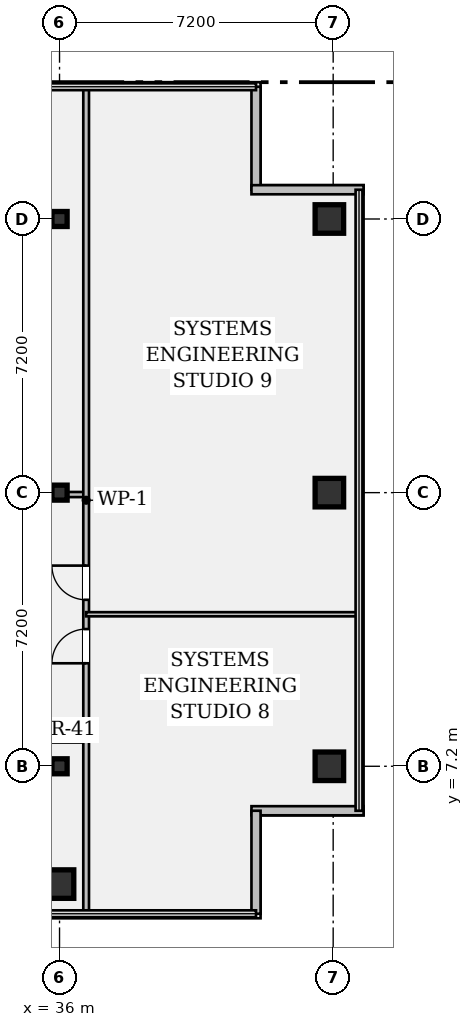
"""IFC4 building model, lengths in metres.
Left out: names, types, materials, properties, quantities, classifications, styles, units other than length and angle.
Written with IfcOpenShell. Run it as: python <this file> out.ifc"""

import sys

from ifc_helpers import new_model, si_unit, direction, frame, frame_2d, origin, origin_2d, place, context, subcontext, project, spatial, rectangle, hollow_rectangle, i_section, extrude, element, fill, save


model = new_model("IFC4")
c1 = context("Model", 3, precision=1e-05, world=origin(), true_north=direction((0.0, 1.0)))
c2 = subcontext(c1, "Body", "Model", "MODEL_VIEW")
j1 = project(units=[si_unit("LENGTHUNIT", "METRE"), si_unit("PLANEANGLEUNIT", "RADIAN")], contexts=[c1])
p1 = place(None, origin())
s1 = spatial("IfcSite", under=j1, at=p1, CompositionType="ELEMENT")
p2 = place(p1, origin())
s2 = spatial("IfcBuilding", under=s1, at=p2, CompositionType="ELEMENT")
p3 = place(p2, frame((0.0, 0.0, 229.25)))
s3 = spatial("IfcBuildingStorey", under=s2, at=p3, CompositionType="ELEMENT", Elevation=229.25)
p4 = place(p3, frame((36.0, 4.1, 0.0), z_axis=(0.0, 0.0, 1.0), x_axis=(1.0, 0.0, 0.0)))
e1 = element("IfcColumn", 1, at=p4, inside=s3, PredefinedType="COLUMN", context=c2, shape_type="SweptSolid", body=[
    extrude(hollow_rectangle(XDim=0.75, YDim=0.75, WallThickness=0.045, at=origin_2d()), origin(), (0.0, 0.0, 1.0), 3.24),
])
for number, where, z_axis, x_axis in (
    (2, (36.0, 7.2, 0.0), (0.0, 0.0, 1.0), (1.0, 0.0, 0.0)),
    (3, (36.0, 14.4, 0.0), (0.0, 0.0, 1.0), (1.0, 0.0, 0.0)),
    (4, (36.0, 21.6, 0.0), (0.0, 0.0, 1.0), (1.0, 0.0, 0.0)),
):
    element("IfcColumn", number, at=place(p3, frame(where, z_axis=z_axis, x_axis=x_axis)), inside=s3, PredefinedType="COLUMN", context=c2, shape_type="SweptSolid", body=[
        extrude(i_section(OverallWidth=0.399, OverallDepth=0.394, WebThickness=0.023, FlangeThickness=0.037, FilletRadius=0.018, at=origin_2d()), origin(), (0.0, 0.0, 1.0), 3.24),
    ])
for number, where, z_axis, x_axis in (
    (5, (43.1, 7.2, 0.0), (0.0, 0.0, 1.0), (1.0, 0.0, 0.0)),
    (6, (43.1, 14.4, 0.0), (0.0, 0.0, 1.0), (1.0, 0.0, 0.0)),
    (7, (43.1, 21.6, 0.0), (0.0, 0.0, 1.0), (1.0, 0.0, 0.0)),
):
    element("IfcColumn", number, at=place(p3, frame(where, z_axis=z_axis, x_axis=x_axis)), inside=s3, PredefinedType="COLUMN", context=c2, shape_type="SweptSolid", body=[
        extrude(hollow_rectangle(XDim=0.75, YDim=0.75, WallThickness=0.045, at=origin_2d()), origin(), (0.0, 0.0, 1.0), 3.24),
    ])
p5 = place(p3, frame((41.17, 25.08, 0.0), z_axis=(0.0, 0.0, 1.0), x_axis=(0.0, -1.0, 0.0)))
e8 = element("IfcWall", 8, at=p5, inside=s3, PredefinedType="STANDARD", context=c2, shape_type="SweptSolid", body=[
    extrude(rectangle(XDim=2.71, YDim=0.24, at=frame_2d((1.355, 0.0))), origin(), (0.0, 0.0, 1.0), 3.24),
])
for number, where, z_axis, x_axis in (
    (9, (41.05, 22.37, 0.0), (0.0, 0.0, 1.0), (1.0, 0.0, 0.0)),
    (10, (44.0, 6.03, 0.0), (0.0, 0.0, 1.0), (-1.0, 0.0, 0.0)),
):
    element("IfcWall", number, at=place(p3, frame(where, z_axis=z_axis, x_axis=x_axis)), inside=s3, PredefinedType="STANDARD", context=c2, shape_type="SweptSolid", body=[
        extrude(rectangle(XDim=2.95, YDim=0.24, at=frame_2d((1.475, 0.0))), origin(), (0.0, 0.0, 1.0), 3.24),
    ])
p6 = place(p3, frame((41.17, 6.03, 0.0), z_axis=(0.0, 0.0, 1.0), x_axis=(0.0, -1.0, 0.0)))
e11 = element("IfcWall", 11, at=p6, inside=s3, PredefinedType="STANDARD", context=c2, shape_type="SweptSolid", body=[
    extrude(rectangle(XDim=2.71, YDim=0.24, at=frame_2d((1.355, 0.0))), origin(), (0.0, 0.0, 1.0), 3.24),
])
p7 = place(p3, frame((34.75, 7.9, 0.0), z_axis=(0.0, 0.0, 1.0), x_axis=(1.0, 0.0, 0.0)))
e12 = element("IfcWall", 12, at=p7, inside=s3, PredefinedType="PARTITIONING", context=c2, shape_type="SweptSolid", body=[
    extrude(rectangle(XDim=1.95, YDim=0.15, at=frame_2d((0.975, 0.0))), origin(), (0.0, 0.0, 1.0), 2.325),
])
p8 = place(p3, frame((34.75, 14.35, 0.0), z_axis=(0.0, 0.0, 1.0), x_axis=(1.0, 0.0, 0.0)))
e13 = element("IfcWall", 13, at=p8, inside=s3, PredefinedType="PARTITIONING", context=c2, shape_type="SweptSolid", body=[
    extrude(rectangle(XDim=1.95, YDim=0.135, at=frame_2d((0.975, 0.0))), origin(), (0.0, 0.0, 1.0), 2.325),
])
p9 = place(p3, frame((36.7, 3.32, 0.0), z_axis=(0.0, 0.0, 1.0), x_axis=(0.0, 1.0, 0.0)))
e14 = element("IfcWall", 14, at=p9, inside=s3, PredefinedType="PARTITIONING", context=c2, shape_type="SweptSolid", body=[
    extrude(rectangle(XDim=21.76, YDim=0.15, at=frame_2d((10.88, 0.0))), origin(), (0.0, 0.0, 1.0), 2.325),
])
p10 = place(p9, frame((6.59, 0.0, 0.0)))
e15 = element("IfcOpeningElement", 15, at=p10, cuts=e14, PredefinedType="OPENING", context=c2, shape_type="SweptSolid", body=[
    extrude(rectangle(XDim=0.9, YDim=2.15, at=frame_2d((0.45, 1.075))), frame((0.0, 0.087, 0.0), z_axis=(0.0, -1.0, 0.0), x_axis=(1.0, 0.0, 0.0)), (0.0, 0.0, 1.0), 0.174),
])
p11 = place(p9, frame((8.26, 0.0, 0.0)))
e16 = element("IfcOpeningElement", 16, at=p11, cuts=e14, PredefinedType="OPENING", context=c2, shape_type="SweptSolid", body=[
    extrude(rectangle(XDim=0.9, YDim=2.15, at=frame_2d((0.45, 1.075))), frame((0.0, 0.087, 0.0), z_axis=(0.0, -1.0, 0.0), x_axis=(1.0, 0.0, 0.0)), (0.0, 0.0, 1.0), 0.174),
])
p12 = place(p3, frame((36.7, 11.2, 0.0), z_axis=(0.0, 0.0, 1.0), x_axis=(1.0, 0.0, 0.0)))
e17 = element("IfcWall", 17, at=p12, inside=s3, PredefinedType="PARTITIONING", context=c2, shape_type="SweptSolid", body=[
    extrude(rectangle(XDim=7.18, YDim=0.11, at=frame_2d((3.59, 0.0))), origin(), (0.0, 0.0, 1.0), 3.24),
])
p13 = place(p10, origin())
e18 = element("IfcDoor", 18, at=p13, inside=s3, OperationType="SINGLE_SWING_LEFT", PredefinedType="DOOR", context=c2, shape_type="SweptSolid", body=[
    extrude(rectangle(XDim=0.9, YDim=2.15, at=frame_2d((0.45, 1.075))), frame((0.0, 0.025, 0.0), z_axis=(0.0, -1.0, 0.0), x_axis=(1.0, 0.0, 0.0)), (0.0, 0.0, 1.0), 0.05),
])
fill(e15, e18)
p14 = place(p11, origin())
e19 = element("IfcDoor", 19, at=p14, inside=s3, OperationType="SINGLE_SWING_RIGHT", PredefinedType="DOOR", context=c2, shape_type="SweptSolid", body=[
    extrude(rectangle(XDim=0.9, YDim=2.15, at=frame_2d((0.45, 1.075))), frame((0.0, 0.025, 0.0), z_axis=(0.0, -1.0, 0.0), x_axis=(1.0, 0.0, 0.0)), (0.0, 0.0, 1.0), 0.05),
])
fill(e16, e19)
save(model, sys.argv[1])
